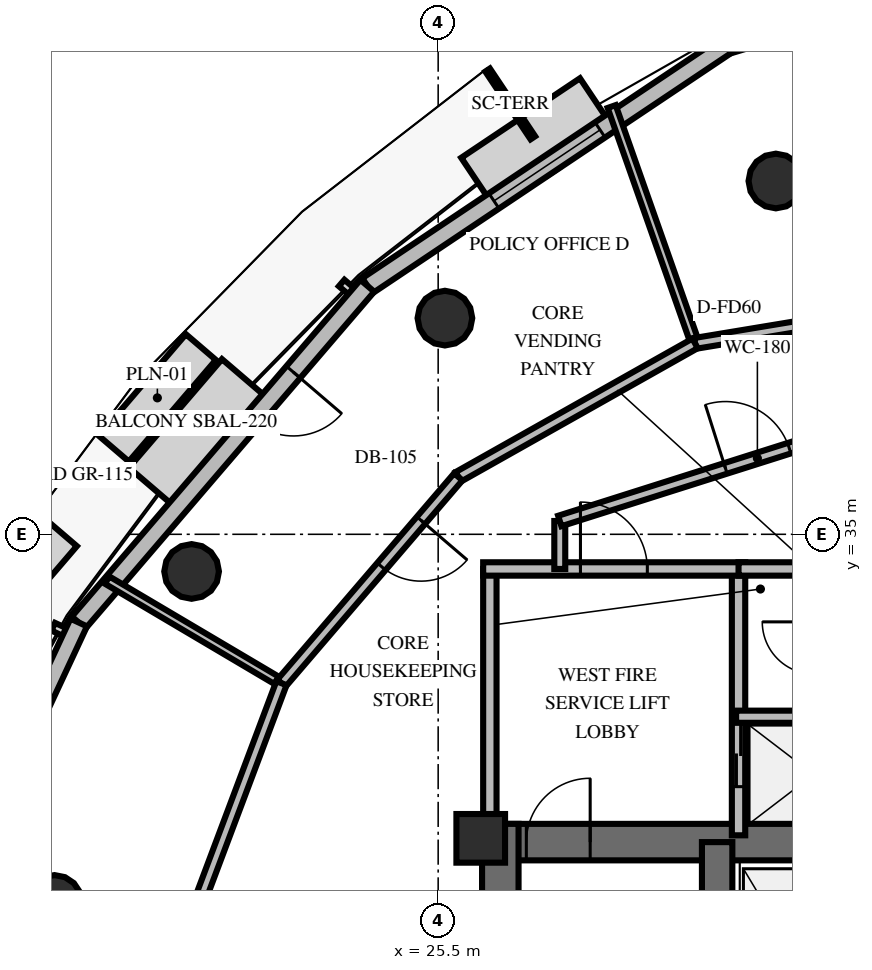
"""IFC4 building model, lengths in metres.
Left out: names, types, materials, properties, quantities, classifications, styles, units other than length and angle.
Written with IfcOpenShell. Run it as: python <this file> out.ifc"""

import sys

from ifc_helpers import new_model, si_unit, direction, frame, frame_2d, origin, origin_2d, place, context, subcontext, project, spatial, rectangle, circle, extrude, element, fill, save


model = new_model("IFC4")
c1 = context("Model", 3, precision=1e-05, world=origin(), true_north=direction((0.0, 1.0)))
c2 = subcontext(c1, "Body", "Model", "MODEL_VIEW")
j1 = project(units=[si_unit("LENGTHUNIT", "METRE"), si_unit("PLANEANGLEUNIT", "RADIAN")], contexts=[c1])
p1 = place(None, origin())
s1 = spatial("IfcSite", under=j1, at=p1, CompositionType="ELEMENT")
p2 = place(p1, origin())
s2 = spatial("IfcBuilding", under=s1, at=p2, CompositionType="ELEMENT")
p3 = place(p2, frame((0.0, 0.0, 237.6)))
s3 = spatial("IfcBuildingStorey", under=s2, at=p3, CompositionType="ELEMENT", Elevation=237.6)
p4 = place(p3, frame((26.222, 29.938, 0.0), z_axis=(0.0, 0.0, 1.0), x_axis=(1.0, 0.0, 0.0)))
e1 = element("IfcWall", 1, at=p4, inside=s3, PredefinedType="SHEAR", context=c2, shape_type="SweptSolid", body=[
    extrude(rectangle(XDim=15.566, YDim=0.6, at=frame_2d((7.783, 0.0))), origin(), (0.0, 0.0, 1.0), 3.6),
])
p5 = place(p4, frame((0.728, 0.0, 0.0)))
e2 = element("IfcOpeningElement", 2, at=p5, cuts=e1, PredefinedType="OPENING", context=c2, shape_type="SweptSolid", body=[
    extrude(rectangle(XDim=1.05, YDim=2.15, at=frame_2d((0.525, 1.075))), frame((0.0, 0.31, 0.0), z_axis=(0.0, -1.0, 0.0), x_axis=(1.0, 0.0, 0.0)), (0.0, 0.0, 1.0), 0.62),
])
p6 = place(p4, frame((13.778, 0.0, 0.0)))
e3 = element("IfcOpeningElement", 3, at=p6, cuts=e1, PredefinedType="OPENING", context=c2, shape_type="SweptSolid", body=[
    extrude(rectangle(XDim=1.05, YDim=2.15, at=frame_2d((0.525, 1.075))), frame((0.0, 0.31, 0.0), z_axis=(0.0, -1.0, 0.0), x_axis=(1.0, 0.0, 0.0)), (0.0, 0.0, 1.0), 0.62),
])
p7 = place(p4, frame((7.228, 0.0, 0.0)))
e4 = element("IfcOpeningElement", 4, at=p7, cuts=e1, PredefinedType="OPENING", context=c2, shape_type="SweptSolid", body=[
    extrude(rectangle(XDim=1.1, YDim=2.15, at=frame_2d((0.55, 1.075))), frame((0.0, 0.31, 0.0), z_axis=(0.0, -1.0, 0.0), x_axis=(1.0, 0.0, 0.0)), (0.0, 0.0, 1.0), 0.62),
])
p8 = place(p3, frame((26.522, 19.962, 0.0), z_axis=(0.0, 0.0, 1.0), x_axis=(0.0, 1.0, 0.0)))
e5 = element("IfcWall", 5, at=p8, inside=s3, PredefinedType="SHEAR", context=c2, shape_type="SweptSolid", body=[
    extrude(rectangle(XDim=10.276, YDim=0.6, at=frame_2d((5.138, 0.0))), origin(), (0.0, 0.0, 1.0), 3.6),
])
p9 = place(p3, frame((30.088, 20.262, 0.0), z_axis=(0.0, 0.0, 1.0), x_axis=(0.0, 1.0, 0.0)))
e6 = element("IfcWall", 6, at=p9, inside=s3, PredefinedType="SHEAR", context=c2, shape_type="SweptSolid", body=[
    extrude(rectangle(XDim=9.676, YDim=0.5, at=frame_2d((4.838, 0.0))), origin(), (0.0, 0.0, 1.0), 3.6),
])
p10 = place(p3, frame((26.2, 30.0, 0.0), z_axis=(0.0, 0.0, 1.0), x_axis=(1.0, 0.0, 0.0)))
e7 = element("IfcColumn", 7, at=p10, inside=s3, PredefinedType="PILASTER", context=c2, shape_type="SweptSolid", body=[
    extrude(rectangle(XDim=0.8, YDim=0.8, at=origin_2d()), origin(), (0.0, 0.0, 1.0), 3.6),
])
for number, where, z_axis, x_axis in (
    (8, (31.054, 40.81, 0.0), (0.0, 0.0, 1.0), (1.0, 0.0, 0.0)),
    (9, (25.611, 38.555, 0.0), (0.0, 0.0, 1.0), (1.0, 0.0, 0.0)),
    (10, (21.445, 34.389, 0.0), (0.0, 0.0, 1.0), (1.0, 0.0, 0.0)),
    (11, (19.19, 28.946, 0.0), (0.0, 0.0, 1.0), (1.0, 0.0, 0.0)),
):
    element("IfcColumn", number, at=place(p3, frame(where, z_axis=z_axis, x_axis=x_axis)), inside=s3, PredefinedType="COLUMN", context=c2, shape_type="SweptSolid", body=[
        extrude(circle(Radius=0.45, at=origin_2d()), origin(), (0.0, 0.0, 1.0), 3.6),
    ])
p11 = place(p3, frame((36.611, 44.949, 0.0), z_axis=(0.0, 0.0, 1.0), x_axis=(-0.958088870216, -0.286471144739, 0.0)))
e12 = element("IfcWall", 12, at=p11, inside=s3, PredefinedType="SOLIDWALL", context=c2, shape_type="SweptSolid", body=[
    extrude(rectangle(XDim=6.643, YDim=0.3, at=frame_2d((3.322, 0.0))), origin(), (0.0, 0.0, 1.0), 2.76),
])
p12 = place(p11, frame((2.272, 0.0, 0.8)))
e13 = element("IfcOpeningElement", 13, at=p12, cuts=e12, PredefinedType="OPENING", context=c2, shape_type="SweptSolid", body=[
    extrude(rectangle(XDim=2.1, YDim=1.85, at=frame_2d((1.05, 0.925))), frame((0.0, 0.16, 0.0), z_axis=(0.0, -1.0, 0.0), x_axis=(1.0, 0.0, 0.0)), (0.0, 0.0, 1.0), 0.32),
])
p13 = place(p3, frame((30.247, 43.046, 0.0), z_axis=(0.0, 0.0, 1.0), x_axis=(-0.830897686813, -0.556425227725, 0.0)))
e14 = element("IfcWall", 14, at=p13, inside=s3, PredefinedType="SOLIDWALL", context=c2, shape_type="SweptSolid", body=[
    extrude(rectangle(XDim=7.115, YDim=0.3, at=frame_2d((3.558, 0.0))), origin(), (0.0, 0.0, 1.0), 2.76),
])
p14 = place(p13, frame((2.508, 0.0, 0.8)))
e15 = element("IfcOpeningElement", 15, at=p14, cuts=e14, PredefinedType="OPENING", context=c2, shape_type="SweptSolid", body=[
    extrude(rectangle(XDim=2.1, YDim=1.85, at=frame_2d((1.05, 0.925))), frame((0.0, 0.16, 0.0), z_axis=(0.0, -1.0, 0.0), x_axis=(1.0, 0.0, 0.0)), (0.0, 0.0, 1.0), 0.32),
])
p15 = place(p3, frame((24.335, 39.087, 0.0), z_axis=(0.0, 0.0, 1.0), x_axis=(-0.650777589735, -0.759268416767, 0.0)))
e16 = element("IfcWall", 16, at=p15, inside=s3, PredefinedType="SOLIDWALL", context=c2, shape_type="SweptSolid", body=[
    extrude(rectangle(XDim=7.293, YDim=0.3, at=frame_2d((3.646, 0.0))), origin(), (0.0, 0.0, 1.0), 2.76),
])
p16 = place(p15, frame((1.87, 0.0, 0.0)))
e17 = element("IfcOpeningElement", 17, at=p16, cuts=e16, PredefinedType="OPENING", context=c2, shape_type="SweptSolid", body=[
    extrude(rectangle(XDim=1.05, YDim=2.15, at=frame_2d((0.525, 1.075))), frame((0.0, 0.16, 0.0), z_axis=(0.0, -1.0, 0.0), x_axis=(1.0, 0.0, 0.0)), (0.0, 0.0, 1.0), 0.32),
])
p17 = place(p3, frame((19.588, 33.55, 0.0), z_axis=(0.0, 0.0, 1.0), x_axis=(-0.422755852514, -0.90624361469, 0.0)))
e18 = element("IfcWall", 18, at=p17, inside=s3, PredefinedType="SOLIDWALL", context=c2, shape_type="SweptSolid", body=[
    extrude(rectangle(XDim=7.115, YDim=0.3, at=frame_2d((3.558, 0.0))), origin(), (0.0, 0.0, 1.0), 2.76),
])
p18 = place(p17, frame((2.508, 0.0, 0.8)))
e19 = element("IfcOpeningElement", 19, at=p18, cuts=e18, PredefinedType="OPENING", context=c2, shape_type="SweptSolid", body=[
    extrude(rectangle(XDim=2.1, YDim=1.85, at=frame_2d((1.05, 0.925))), frame((0.0, 0.16, 0.0), z_axis=(0.0, -1.0, 0.0), x_axis=(1.0, 0.0, 0.0)), (0.0, 0.0, 1.0), 0.32),
])
p19 = place(p3, frame((26.35, 30.05, 0.0), z_axis=(0.0, 0.0, 1.0), x_axis=(0.0, 1.0, 0.0)))
e20 = element("IfcWall", 20, at=p19, inside=s3, PredefinedType="SOLIDWALL", context=c2, shape_type="SweptSolid", body=[
    extrude(rectangle(XDim=4.38, YDim=0.22, at=frame_2d((2.19, 0.0))), origin(), (0.0, 0.0, 1.0), 2.46),
])
p20 = place(p3, frame((30.44, 30.05, 0.0), z_axis=(0.0, 0.0, 1.0), x_axis=(0.0, 1.0, 0.0)))
e21 = element("IfcWall", 21, at=p20, inside=s3, PredefinedType="SOLIDWALL", context=c2, shape_type="SweptSolid", body=[
    extrude(rectangle(XDim=4.38, YDim=0.22, at=frame_2d((2.19, 0.0))), origin(), (0.0, 0.0, 1.0), 2.46),
])
p21 = place(p20, frame((0.8, 0.0, 0.0)))
e22 = element("IfcOpeningElement", 22, at=p21, cuts=e21, PredefinedType="OPENING", context=c2, shape_type="SweptSolid", body=[
    extrude(rectangle(XDim=1.05, YDim=2.1, at=frame_2d((0.525, 1.05))), frame((0.0, 0.12, 0.0), z_axis=(0.0, -1.0, 0.0), x_axis=(1.0, 0.0, 0.0)), (0.0, 0.0, 1.0), 0.24),
])
p22 = place(p3, frame((26.24, 34.43, 0.0), z_axis=(0.0, 0.0, 1.0), x_axis=(1.0, 0.0, 0.0)))
e23 = element("IfcWall", 23, at=p22, inside=s3, PredefinedType="SOLIDWALL", context=c2, shape_type="SweptSolid", body=[
    extrude(rectangle(XDim=4.31, YDim=0.22, at=frame_2d((2.155, 0.0))), origin(), (0.0, 0.0, 1.0), 2.46),
])
p23 = place(p22, frame((1.6, 0.0, 0.0)))
e24 = element("IfcOpeningElement", 24, at=p23, cuts=e23, PredefinedType="OPENING", context=c2, shape_type="SweptSolid", body=[
    extrude(rectangle(XDim=1.1, YDim=2.15, at=frame_2d((0.55, 1.075))), frame((0.0, 0.12, 0.0), z_axis=(0.0, -1.0, 0.0), x_axis=(1.0, 0.0, 0.0)), (0.0, 0.0, 1.0), 0.24),
])
p24 = place(p3, frame((30.4, 32.0, 0.0), z_axis=(0.0, 0.0, 1.0), x_axis=(1.0, 0.0, 0.0)))
e25 = element("IfcWall", 25, at=p24, inside=s3, PredefinedType="SOLIDWALL", context=c2, shape_type="SweptSolid", body=[
    extrude(rectangle(XDim=2.55, YDim=0.2, at=frame_2d((1.275, 0.0))), origin(), (0.0, 0.0, 1.0), 2.46),
])
p25 = place(p3, frame((30.44, 34.43, 0.0), z_axis=(0.0, 0.0, 1.0), x_axis=(1.0, 0.0, 0.0)))
e26 = element("IfcWall", 26, at=p25, inside=s3, PredefinedType="SOLIDWALL", context=c2, shape_type="SweptSolid", body=[
    extrude(rectangle(XDim=7.12, YDim=0.22, at=frame_2d((3.56, 0.0))), origin(), (0.0, 0.0, 1.0), 2.46),
])
p26 = place(p25, frame((3.01, 0.0, 0.0)))
e27 = element("IfcOpeningElement", 27, at=p26, cuts=e26, PredefinedType="OPENING", context=c2, shape_type="SweptSolid", body=[
    extrude(rectangle(XDim=1.1, YDim=2.15, at=frame_2d((0.55, 1.075))), frame((0.0, 0.12, 0.0), z_axis=(0.0, -1.0, 0.0), x_axis=(1.0, 0.0, 0.0)), (0.0, 0.0, 1.0), 0.24),
])
p27 = place(p3, frame((27.5, 34.43, 0.0), z_axis=(0.0, 0.0, 1.0), x_axis=(0.0, 1.0, 0.0)))
e28 = element("IfcWall", 28, at=p27, inside=s3, PredefinedType="PARTITIONING", context=c2, shape_type="SweptSolid", body=[
    extrude(rectangle(XDim=0.789, YDim=0.18, at=frame_2d((0.395, 0.0))), origin(), (0.0, 0.0, 1.0), 2.46),
])
p28 = place(p3, frame((27.5, 35.219, 0.0), z_axis=(0.0, 0.0, 1.0), x_axis=(0.953228121756, 0.302251795518, 0.0)))
e29 = element("IfcWall", 29, at=p28, inside=s3, PredefinedType="PARTITIONING", context=c2, shape_type="SweptSolid", body=[
    extrude(rectangle(XDim=6.819, YDim=0.18, at=frame_2d((3.409, 0.0))), origin(), (0.0, 0.0, 1.0), 2.46),
])
p29 = place(p28, frame((2.86, 0.0, 0.0)))
e30 = element("IfcOpeningElement", 30, at=p29, cuts=e29, PredefinedType="OPENING", context=c2, shape_type="SweptSolid", body=[
    extrude(rectangle(XDim=1.1, YDim=2.15, at=frame_2d((0.55, 1.075))), frame((0.0, 0.1, 0.0), z_axis=(0.0, -1.0, 0.0), x_axis=(1.0, 0.0, 0.0)), (0.0, 0.0, 1.0), 0.2),
])
p30 = place(p3, frame((29.725, 38.139, 0.0), z_axis=(0.0, 0.0, 1.0), x_axis=(-0.332179937454, 0.94321603525, 0.0)))
e31 = element("IfcWall", 31, at=p30, inside=s3, PredefinedType="PARTITIONING", context=c2, shape_type="SweptSolid", body=[
    extrude(rectangle(XDim=4.13, YDim=0.14, at=frame_2d((2.065, 0.0))), origin(), (0.0, 0.0, 1.0), 2.46),
])
p31 = place(p3, frame((34.135, 38.869, 0.0), z_axis=(0.0, 0.0, 1.0), x_axis=(-0.986573435215, -0.163318268813, 0.0)))
e32 = element("IfcWall", 32, at=p31, inside=s3, PredefinedType="PARTITIONING", context=c2, shape_type="SweptSolid", body=[
    extrude(rectangle(XDim=4.47, YDim=0.18, at=frame_2d((2.235, 0.0))), origin(), (0.0, 0.0, 1.0), 2.46),
])
p32 = place(p31, frame((0.942, 0.0, 0.0)))
e33 = element("IfcOpeningElement", 33, at=p32, cuts=e32, PredefinedType="OPENING", context=c2, shape_type="SweptSolid", body=[
    extrude(rectangle(XDim=1.0, YDim=2.15, at=frame_2d((0.5, 1.075))), frame((0.0, 0.1, 0.0), z_axis=(0.0, -1.0, 0.0), x_axis=(1.0, 0.0, 0.0)), (0.0, 0.0, 1.0), 0.2),
])
p33 = place(p3, frame((22.922, 32.552, 0.0), z_axis=(0.0, 0.0, 1.0), x_axis=(-0.860754301827, 0.509020659587, 0.0)))
e34 = element("IfcWall", 34, at=p33, inside=s3, PredefinedType="PARTITIONING", context=c2, shape_type="SweptSolid", body=[
    extrude(rectangle(XDim=3.331, YDim=0.14, at=frame_2d((1.666, 0.0))), origin(), (0.0, 0.0, 1.0), 2.46),
])
p34 = place(p3, frame((29.725, 38.139, 0.0), z_axis=(0.0, 0.0, 1.0), x_axis=(-0.871198932887, -0.490930157291, 0.0)))
e35 = element("IfcWall", 35, at=p34, inside=s3, PredefinedType="PARTITIONING", context=c2, shape_type="SweptSolid", body=[
    extrude(rectangle(XDim=4.47, YDim=0.18, at=frame_2d((2.235, 0.0))), origin(), (0.0, 0.0, 1.0), 2.46),
])
p35 = place(p3, frame((25.831, 35.945, 0.0), z_axis=(0.0, 0.0, 1.0), x_axis=(-0.650782376626, -0.759264313841, 0.0)))
e36 = element("IfcWall", 36, at=p35, inside=s3, PredefinedType="PARTITIONING", context=c2, shape_type="SweptSolid", body=[
    extrude(rectangle(XDim=4.469, YDim=0.18, at=frame_2d((2.235, 0.0))), origin(), (0.0, 0.0, 1.0), 2.46),
])
p36 = place(p35, frame((0.942, 0.0, 0.0)))
e37 = element("IfcOpeningElement", 37, at=p36, cuts=e36, PredefinedType="OPENING", context=c2, shape_type="SweptSolid", body=[
    extrude(rectangle(XDim=1.0, YDim=2.15, at=frame_2d((0.5, 1.075))), frame((0.0, 0.1, 0.0), z_axis=(0.0, -1.0, 0.0), x_axis=(1.0, 0.0, 0.0)), (0.0, 0.0, 1.0), 0.2),
])
p37 = place(p3, frame((22.922, 32.552, 0.0), z_axis=(0.0, 0.0, 1.0), x_axis=(-0.351853579162, -0.936055051175, 0.0)))
e38 = element("IfcWall", 38, at=p37, inside=s3, PredefinedType="PARTITIONING", context=c2, shape_type="SweptSolid", body=[
    extrude(rectangle(XDim=4.47, YDim=0.18, at=frame_2d((2.235, 0.0))), origin(), (0.0, 0.0, 1.0), 2.46),
])
p38 = place(p14, origin())
e39 = element("IfcWindow", 39, at=p38, inside=s3, PartitioningType="SINGLE_PANEL", PredefinedType="WINDOW", context=c2, shape_type="SweptSolid", body=[
    extrude(rectangle(XDim=2.1, YDim=1.85, at=frame_2d((1.05, 0.925))), frame((0.0, 0.03, 0.0), z_axis=(0.0, -1.0, 0.0), x_axis=(1.0, 0.0, 0.0)), (0.0, 0.0, 1.0), 0.06),
])
fill(e15, e39)
p39 = place(p16, origin())
e40 = element("IfcDoor", 40, at=p39, inside=s3, OperationType="SINGLE_SWING_LEFT", PredefinedType="DOOR", context=c2, shape_type="SweptSolid", body=[
    extrude(rectangle(XDim=1.05, YDim=2.15, at=frame_2d((0.525, 1.075))), frame((0.0, 0.025, 0.0), z_axis=(0.0, -1.0, 0.0), x_axis=(1.0, 0.0, 0.0)), (0.0, 0.0, 1.0), 0.05),
])
fill(e17, e40)
p40 = place(p5, origin())
e41 = element("IfcDoor", 41, at=p40, inside=s3, OperationType="SINGLE_SWING_RIGHT", PredefinedType="DOOR", context=c2, shape_type="SweptSolid", body=[
    extrude(rectangle(XDim=1.05, YDim=2.15, at=frame_2d((0.525, 1.075))), frame((0.0, 0.025, 0.0), z_axis=(0.0, -1.0, 0.0), x_axis=(1.0, 0.0, 0.0)), (0.0, 0.0, 1.0), 0.05),
])
fill(e2, e41)
p41 = place(p23, origin())
e42 = element("IfcDoor", 42, at=p41, inside=s3, OperationType="SINGLE_SWING_LEFT", PredefinedType="DOOR", context=c2, shape_type="SweptSolid", body=[
    extrude(rectangle(XDim=1.1, YDim=2.15, at=frame_2d((0.55, 1.075))), frame((0.0, 0.025, 0.0), z_axis=(0.0, -1.0, 0.0), x_axis=(1.0, 0.0, 0.0)), (0.0, 0.0, 1.0), 0.05),
])
fill(e24, e42)
p42 = place(p21, origin())
e43 = element("IfcDoor", 43, at=p42, inside=s3, OperationType="DOUBLE_DOOR_SLIDING", PredefinedType="USERDEFINED", context=c2, shape_type="SweptSolid", body=[
    extrude(rectangle(XDim=1.05, YDim=2.1, at=frame_2d((0.525, 1.05))), frame((0.0, 0.025, 0.0), z_axis=(0.0, -1.0, 0.0), x_axis=(1.0, 0.0, 0.0)), (0.0, 0.0, 1.0), 0.05),
])
fill(e22, e43)
p43 = place(p29, origin())
e44 = element("IfcDoor", 44, at=p43, inside=s3, OperationType="SINGLE_SWING_LEFT", PredefinedType="DOOR", context=c2, shape_type="SweptSolid", body=[
    extrude(rectangle(XDim=1.1, YDim=2.15, at=frame_2d((0.55, 1.075))), frame((0.0, 0.025, 0.0), z_axis=(0.0, -1.0, 0.0), x_axis=(1.0, 0.0, 0.0)), (0.0, 0.0, 1.0), 0.05),
])
fill(e30, e44)
p44 = place(p36, origin())
e45 = element("IfcDoor", 45, at=p44, inside=s3, OperationType="SINGLE_SWING_LEFT", PredefinedType="DOOR", context=c2, shape_type="SweptSolid", body=[
    extrude(rectangle(XDim=1.0, YDim=2.15, at=frame_2d((0.5, 1.075))), frame((0.0, 0.025, 0.0), z_axis=(0.0, -1.0, 0.0), x_axis=(1.0, 0.0, 0.0)), (0.0, 0.0, 1.0), 0.05),
])
fill(e37, e45)
save(model, sys.argv[1])
